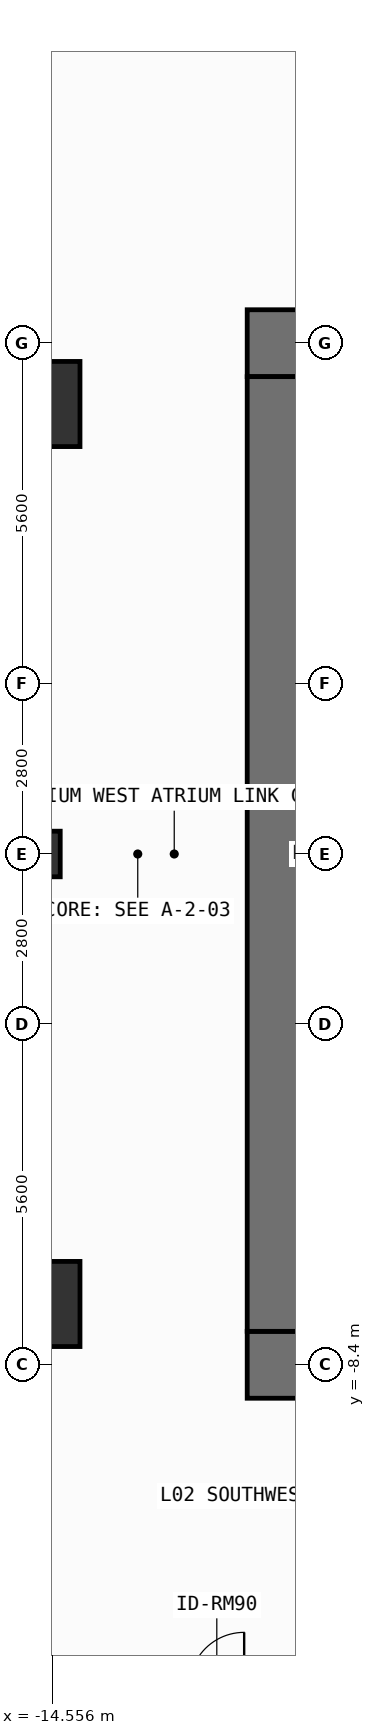
"""IFC4 building model, lengths in metres.
Left out: names, types, materials, properties, quantities, classifications, styles, units other than length and angle.
Written with IfcOpenShell. Run it as: python <this file> out.ifc"""

import sys

from ifc_helpers import new_model, si_unit, direction, frame, frame_2d, origin, origin_2d, place, context, subcontext, project, spatial, rectangle, extrude, element, save


model = new_model("IFC4")
c1 = context("Model", 3, precision=1e-05, world=origin(), true_north=direction((0.0, 1.0)))
c2 = subcontext(c1, "Body", "Model", "MODEL_VIEW")
j1 = project(units=[si_unit("LENGTHUNIT", "METRE"), si_unit("PLANEANGLEUNIT", "RADIAN")], contexts=[c1])
p1 = place(None, origin())
s1 = spatial("IfcSite", under=j1, at=p1, CompositionType="ELEMENT")
p2 = place(p1, origin())
s2 = spatial("IfcBuilding", under=s1, at=p2, CompositionType="ELEMENT")
p3 = place(p2, frame((0.0, 0.0, 4.8)))
s3 = spatial("IfcBuildingStorey", under=s2, at=p3, CompositionType="ELEMENT", Elevation=4.8)
for number, where, z_axis, x_axis in (
    (1, (-11.35, -8.4, 0.0), (0.0, 0.0, 1.0), (1.0, 0.0, 0.0)),
    (2, (-11.35, 8.4, 0.0), (0.0, 0.0, 1.0), (1.0, 0.0, 0.0)),
):
    element("IfcWall", number, at=place(p3, frame(where, z_axis=z_axis, x_axis=x_axis)), inside=s3, PredefinedType="SHEAR", context=c2, shape_type="SweptSolid", body=[
        extrude(rectangle(XDim=1.65, YDim=1.1, at=frame_2d((0.825, 0.0))), origin(), (0.0, 0.0, 1.0), 4.2),
    ])
p4 = place(p3, frame((-10.8, -7.85, 0.0), z_axis=(0.0, 0.0, 1.0), x_axis=(0.0, 1.0, 0.0)))
e3 = element("IfcWall", 3, at=p4, inside=s3, PredefinedType="SHEAR", context=c2, shape_type="SweptSolid", body=[
    extrude(rectangle(XDim=15.7, YDim=1.1, at=frame_2d((7.85, 0.0))), origin(), (0.0, 0.0, 1.0), 4.2),
])
for number, where, z_axis, x_axis in (
    (4, (-14.8, -7.4, 0.0), (0.0, 0.0, 1.0), (1.0, 0.0, 0.0)),
    (5, (-14.8, 7.4, 0.0), (0.0, 0.0, 1.0), (1.0, 0.0, 0.0)),
):
    element("IfcColumn", number, at=place(p3, frame(where, z_axis=z_axis, x_axis=x_axis)), inside=s3, PredefinedType="COLUMN", context=c2, shape_type="SweptSolid", body=[
        extrude(rectangle(XDim=1.4, YDim=1.4, at=origin_2d()), origin(), (0.0, 0.0, 1.0), 4.2),
    ])
p5 = place(p3, frame((-14.8, 0.0, 0.0), z_axis=(0.0, 0.0, 1.0), x_axis=(1.0, 0.0, 0.0)))
e6 = element("IfcColumn", 6, at=p5, inside=s3, PredefinedType="COLUMN", context=c2, shape_type="SweptSolid", body=[
    extrude(rectangle(XDim=0.75, YDim=0.75, at=origin_2d()), origin(), (0.0, 0.0, 1.0), 4.2),
])
save(model, sys.argv[1])
